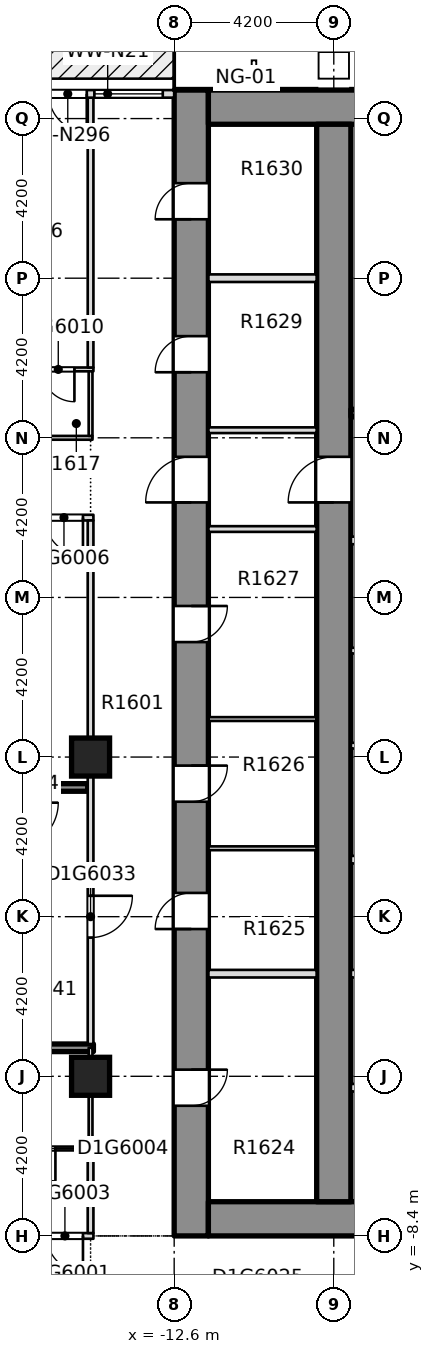
"""IFC4 building model, lengths in metres.
Left out: names, types, materials, properties, quantities, classifications, styles, units other than length and angle.
Written with IfcOpenShell. Run it as: python <this file> out.ifc"""

import sys

from ifc_helpers import new_model, si_unit, direction, frame, frame_2d, origin, origin_2d, place, context, subcontext, project, spatial, rectangle, extrude, element, fill, save


model = new_model("IFC4")
c1 = context("Model", 3, precision=1e-05, world=origin(), true_north=direction((0.0, 1.0)))
c2 = subcontext(c1, "Body", "Model", "MODEL_VIEW")
j1 = project(units=[si_unit("LENGTHUNIT", "METRE"), si_unit("PLANEANGLEUNIT", "RADIAN")], contexts=[c1])
p1 = place(None, origin())
s1 = spatial("IfcSite", under=j1, at=p1, CompositionType="ELEMENT")
p2 = place(p1, origin())
s2 = spatial("IfcBuilding", under=s1, at=p2, CompositionType="ELEMENT")
p3 = place(p2, frame((0.0, 0.0, 69.0)))
s3 = spatial("IfcBuildingStorey", under=s2, at=p3, CompositionType="ELEMENT", Elevation=69.0)
p4 = place(p3, frame((-12.15, -8.4, -0.32), z_axis=(0.0, 0.0, 1.0), x_axis=(0.0, 1.0, 0.0)))
e1 = element("IfcWall", 1, at=p4, inside=s3, PredefinedType="SHEAR", context=c2, shape_type="SweptSolid", body=[
    extrude(rectangle(XDim=30.15, YDim=0.9, at=frame_2d((15.075, 0.0))), origin(), (0.0, 0.0, 1.0), 3.45),
])
p5 = place(p4, frame((3.425, 0.0, 0.32)))
e2 = element("IfcOpeningElement", 2, at=p5, cuts=e1, PredefinedType="OPENING", context=c2, shape_type="SweptSolid", body=[
    extrude(rectangle(XDim=0.95, YDim=2.1, at=frame_2d((0.475, 1.05))), frame((0.0, 0.46, 0.0), z_axis=(0.0, -1.0, 0.0), x_axis=(1.0, 0.0, 0.0)), (0.0, 0.0, 1.0), 0.92),
])
p6 = place(p4, frame((8.075, 0.0, 0.32)))
e3 = element("IfcOpeningElement", 3, at=p6, cuts=e1, PredefinedType="OPENING", context=c2, shape_type="SweptSolid", body=[
    extrude(rectangle(XDim=0.95, YDim=2.1, at=frame_2d((0.475, 1.05))), frame((0.0, 0.46, 0.0), z_axis=(0.0, -1.0, 0.0), x_axis=(1.0, 0.0, 0.0)), (0.0, 0.0, 1.0), 0.92),
])
p7 = place(p4, frame((11.425, 0.0, 0.32)))
e4 = element("IfcOpeningElement", 4, at=p7, cuts=e1, PredefinedType="OPENING", context=c2, shape_type="SweptSolid", body=[
    extrude(rectangle(XDim=0.95, YDim=2.1, at=frame_2d((0.475, 1.05))), frame((0.0, 0.46, 0.0), z_axis=(0.0, -1.0, 0.0), x_axis=(1.0, 0.0, 0.0)), (0.0, 0.0, 1.0), 0.92),
])
p8 = place(p4, frame((15.625, 0.0, 0.32)))
e5 = element("IfcOpeningElement", 5, at=p8, cuts=e1, PredefinedType="OPENING", context=c2, shape_type="SweptSolid", body=[
    extrude(rectangle(XDim=0.95, YDim=2.1, at=frame_2d((0.475, 1.05))), frame((0.0, 0.46, 0.0), z_axis=(0.0, -1.0, 0.0), x_axis=(1.0, 0.0, 0.0)), (0.0, 0.0, 1.0), 0.92),
])
p9 = place(p4, frame((22.725, 0.0, 0.32)))
e6 = element("IfcOpeningElement", 6, at=p9, cuts=e1, PredefinedType="OPENING", context=c2, shape_type="SweptSolid", body=[
    extrude(rectangle(XDim=0.95, YDim=2.1, at=frame_2d((0.475, 1.05))), frame((0.0, 0.46, 0.0), z_axis=(0.0, -1.0, 0.0), x_axis=(1.0, 0.0, 0.0)), (0.0, 0.0, 1.0), 0.92),
])
p10 = place(p4, frame((26.75, 0.0, 0.32)))
e7 = element("IfcOpeningElement", 7, at=p10, cuts=e1, PredefinedType="OPENING", context=c2, shape_type="SweptSolid", body=[
    extrude(rectangle(XDim=0.95, YDim=2.1, at=frame_2d((0.475, 1.05))), frame((0.0, 0.46, 0.0), z_axis=(0.0, -1.0, 0.0), x_axis=(1.0, 0.0, 0.0)), (0.0, 0.0, 1.0), 0.92),
])
p11 = place(p4, frame((19.3, 0.0, 0.32)))
e8 = element("IfcOpeningElement", 8, at=p11, cuts=e1, PredefinedType="OPENING", context=c2, shape_type="SweptSolid", body=[
    extrude(rectangle(XDim=1.2, YDim=2.1, at=frame_2d((0.6, 1.05))), frame((0.0, 0.46, 0.0), z_axis=(0.0, -1.0, 0.0), x_axis=(1.0, 0.0, 0.0)), (0.0, 0.0, 1.0), 0.92),
])
p12 = place(p3, frame((-11.7, -7.95, -0.32), z_axis=(0.0, 0.0, 1.0), x_axis=(1.0, 0.0, 0.0)))
e9 = element("IfcWall", 9, at=p12, inside=s3, PredefinedType="SHEAR", context=c2, shape_type="SweptSolid", body=[
    extrude(rectangle(XDim=23.4, YDim=0.9, at=frame_2d((11.7, 0.0))), origin(), (0.0, 0.0, 1.0), 3.45),
])
p13 = place(p12, frame((6.95, 0.0, 0.32)))
e10 = element("IfcOpeningElement", 10, at=p13, cuts=e9, PredefinedType="OPENING", context=c2, shape_type="SweptSolid", body=[
    extrude(rectangle(XDim=1.8, YDim=2.1, at=frame_2d((0.9, 1.05))), frame((0.0, 0.46, 0.0), z_axis=(0.0, -1.0, 0.0), x_axis=(1.0, 0.0, 0.0)), (0.0, 0.0, 1.0), 0.92),
])
p14 = place(p12, frame((14.65, 0.0, 0.32)))
e11 = element("IfcOpeningElement", 11, at=p14, cuts=e9, PredefinedType="OPENING", context=c2, shape_type="SweptSolid", body=[
    extrude(rectangle(XDim=1.8, YDim=2.1, at=frame_2d((0.9, 1.05))), frame((0.0, 0.46, 0.0), z_axis=(0.0, -1.0, 0.0), x_axis=(1.0, 0.0, 0.0)), (0.0, 0.0, 1.0), 0.92),
])
p15 = place(p3, frame((-11.7, 21.3, -0.32), z_axis=(0.0, 0.0, 1.0), x_axis=(1.0, 0.0, 0.0)))
e12 = element("IfcWall", 12, at=p15, inside=s3, PredefinedType="SOLIDWALL", context=c2, shape_type="SweptSolid", body=[
    extrude(rectangle(XDim=23.4, YDim=0.9, at=frame_2d((11.7, 0.0))), origin(), (0.0, 0.0, 1.0), 3.45),
])
p16 = place(p3, frame((-8.4, -7.5, -0.32), z_axis=(0.0, 0.0, 1.0), x_axis=(0.0, 1.0, 0.0)))
e13 = element("IfcWall", 13, at=p16, inside=s3, PredefinedType="SHEAR", context=c2, shape_type="SweptSolid", body=[
    extrude(rectangle(XDim=28.35, YDim=0.9, at=frame_2d((14.175, 0.0))), origin(), (0.0, 0.0, 1.0), 3.45),
])
p17 = place(p16, frame((18.4, 0.0, 0.32)))
e14 = element("IfcOpeningElement", 14, at=p17, cuts=e13, PredefinedType="OPENING", context=c2, shape_type="SweptSolid", body=[
    extrude(rectangle(XDim=1.2, YDim=2.1, at=frame_2d((0.6, 1.05))), frame((0.0, 0.46, 0.0), z_axis=(0.0, -1.0, 0.0), x_axis=(1.0, 0.0, 0.0)), (0.0, 0.0, 1.0), 0.92),
])
for number, where, z_axis, x_axis in (
    (15, (-14.8, -4.2, -0.32), (0.0, 0.0, 1.0), (1.0, 0.0, 0.0)),
    (16, (-14.8, 4.2, -0.32), (0.0, 0.0, 1.0), (1.0, 0.0, 0.0)),
):
    element("IfcColumn", number, at=place(p3, frame(where, z_axis=z_axis, x_axis=x_axis)), inside=s3, PredefinedType="COLUMN", context=c2, shape_type="SweptSolid", body=[
        extrude(rectangle(XDim=1.0, YDim=1.0, at=origin_2d()), origin(), (0.0, 0.0, 1.0), 3.45),
    ])
p18 = place(p3, frame((-25.75, -8.4, 0.0), z_axis=(0.0, 0.0, 1.0), x_axis=(1.0, 0.0, 0.0)))
e17 = element("IfcWall", 17, at=p18, inside=s3, PredefinedType="PARTITIONING", context=c2, shape_type="SweptSolid", body=[
    extrude(rectangle(XDim=11.025, YDim=0.15, at=frame_2d((5.512, 0.0))), origin(), (0.0, 0.0, 1.0), 3.13),
])
p19 = place(p18, frame((9.8, 0.0, 0.0)))
e18 = element("IfcOpeningElement", 18, at=p19, cuts=e17, PredefinedType="OPENING", context=c2, shape_type="SweptSolid", body=[
    extrude(rectangle(XDim=0.95, YDim=2.1, at=frame_2d((0.475, 1.05))), frame((0.0, 0.085, 0.0), z_axis=(0.0, -1.0, 0.0), x_axis=(1.0, 0.0, 0.0)), (0.0, 0.0, 1.0), 0.17),
])
p20 = place(p3, frame((-17.55, -6.1, 0.0), z_axis=(0.0, 0.0, 1.0), x_axis=(1.0, 0.0, 0.0)))
e19 = element("IfcWall", 19, at=p20, inside=s3, PredefinedType="PARTITIONING", context=c2, shape_type="SweptSolid", body=[
    extrude(rectangle(XDim=2.825, YDim=0.1, at=frame_2d((1.413, 0.0))), origin(), (0.0, 0.0, 1.0), 3.13),
])
p21 = place(p20, frame((0.975, 0.0, 0.0)))
e20 = element("IfcOpeningElement", 20, at=p21, cuts=e19, PredefinedType="OPENING", context=c2, shape_type="SweptSolid", body=[
    extrude(rectangle(XDim=0.85, YDim=2.1, at=frame_2d((0.425, 1.05))), frame((0.0, 0.06, 0.0), z_axis=(0.0, -1.0, 0.0), x_axis=(1.0, 0.0, 0.0)), (0.0, 0.0, 1.0), 0.12),
])
p22 = place(p3, frame((-17.55, -3.45, 0.0), z_axis=(0.0, 0.0, 1.0), x_axis=(1.0, 0.0, 0.0)))
e21 = element("IfcWall", 21, at=p22, inside=s3, PredefinedType="SOLIDWALL", context=c2, shape_type="SweptSolid", body=[
    extrude(rectangle(XDim=2.825, YDim=0.2, at=frame_2d((1.413, 0.0))), origin(), (0.0, 0.0, 1.0), 3.13),
])
p23 = place(p3, frame((-20.45, 3.4, 0.0), z_axis=(0.0, 0.0, 1.0), x_axis=(1.0, 0.0, 0.0)))
e22 = element("IfcWall", 22, at=p23, inside=s3, PredefinedType="SOLIDWALL", context=c2, shape_type="SweptSolid", body=[
    extrude(rectangle(XDim=5.575, YDim=0.2, at=frame_2d((2.788, 0.0))), origin(), (0.0, 0.0, 1.0), 3.13),
])
p24 = place(p3, frame((-25.75, 10.5, 0.0), z_axis=(0.0, 0.0, 1.0), x_axis=(1.0, 0.0, 0.0)))
e23 = element("IfcWall", 23, at=p24, inside=s3, PredefinedType="PARTITIONING", context=c2, shape_type="SweptSolid", body=[
    extrude(rectangle(XDim=11.025, YDim=0.15, at=frame_2d((5.512, 0.0))), origin(), (0.0, 0.0, 1.0), 3.13),
])
p25 = place(p24, frame((9.75, 0.0, 0.0)))
e24 = element("IfcOpeningElement", 24, at=p25, cuts=e23, PredefinedType="OPENING", context=c2, shape_type="SweptSolid", body=[
    extrude(rectangle(XDim=1.0, YDim=2.1, at=frame_2d((0.5, 1.05))), frame((0.0, 0.085, 0.0), z_axis=(0.0, -1.0, 0.0), x_axis=(1.0, 0.0, 0.0)), (0.0, 0.0, 1.0), 0.17),
])
p26 = place(p3, frame((-17.25, 12.6, 0.0), z_axis=(0.0, 0.0, 1.0), x_axis=(1.0, 0.0, 0.0)))
e25 = element("IfcWall", 25, at=p26, inside=s3, PredefinedType="PARTITIONING", context=c2, shape_type="SweptSolid", body=[
    extrude(rectangle(XDim=2.5, YDim=0.1, at=frame_2d((1.25, 0.0))), origin(), (0.0, 0.0, 1.0), 3.13),
])
p27 = place(p3, frame((-17.25, 14.4, 0.0), z_axis=(0.0, 0.0, 1.0), x_axis=(1.0, 0.0, 0.0)))
e26 = element("IfcWall", 26, at=p27, inside=s3, PredefinedType="PARTITIONING", context=c2, shape_type="SweptSolid", body=[
    extrude(rectangle(XDim=2.525, YDim=0.1, at=frame_2d((1.262, 0.0))), origin(), (0.0, 0.0, 1.0), 3.13),
])
p28 = place(p27, frame((1.175, 0.0, 0.0)))
e27 = element("IfcOpeningElement", 27, at=p28, cuts=e26, PredefinedType="OPENING", context=c2, shape_type="SweptSolid", body=[
    extrude(rectangle(XDim=0.85, YDim=2.1, at=frame_2d((0.425, 1.05))), frame((0.0, 0.06, 0.0), z_axis=(0.0, -1.0, 0.0), x_axis=(1.0, 0.0, 0.0)), (0.0, 0.0, 1.0), 0.12),
])
p29 = place(p3, frame((-14.8, -8.325, 0.0), z_axis=(0.0, 0.0, 1.0), x_axis=(0.0, 1.0, 0.0)))
e28 = element("IfcWall", 28, at=p29, inside=s3, PredefinedType="PARTITIONING", context=c2, shape_type="SweptSolid", body=[
    extrude(rectangle(XDim=2.175, YDim=0.15, at=frame_2d((1.087, 0.0))), origin(), (0.0, 0.0, 1.0), 3.13),
])
p30 = place(p3, frame((-14.8, -6.05, 0.0), z_axis=(0.0, 0.0, 1.0), x_axis=(0.0, 1.0, 0.0)))
e29 = element("IfcWall", 29, at=p30, inside=s3, PredefinedType="PARTITIONING", context=c2, shape_type="SweptSolid", body=[
    extrude(rectangle(XDim=2.6, YDim=0.1, at=frame_2d((1.3, 0.0))), origin(), (0.0, 0.0, 1.0), 3.13),
])
p31 = place(p3, frame((-14.8, -3.35, 0.0), z_axis=(0.0, 0.0, 1.0), x_axis=(0.0, 1.0, 0.0)))
e30 = element("IfcWall", 30, at=p31, inside=s3, PredefinedType="PARTITIONING", context=c2, shape_type="SweptSolid", body=[
    extrude(rectangle(XDim=13.775, YDim=0.15, at=frame_2d((6.888, 0.0))), origin(), (0.0, 0.0, 1.0), 3.13),
])
p32 = place(p31, frame((2.8, 0.0, 0.0)))
e31 = element("IfcOpeningElement", 31, at=p32, cuts=e30, PredefinedType="OPENING", context=c2, shape_type="SweptSolid", body=[
    extrude(rectangle(XDim=1.1, YDim=2.1, at=frame_2d((0.55, 1.05))), frame((0.0, 0.085, 0.0), z_axis=(0.0, -1.0, 0.0), x_axis=(1.0, 0.0, 0.0)), (0.0, 0.0, 1.0), 0.17),
])
p33 = place(p3, frame((-14.8, 12.65, 0.0), z_axis=(0.0, 0.0, 1.0), x_axis=(0.0, 1.0, 0.0)))
e32 = element("IfcWall", 32, at=p33, inside=s3, PredefinedType="PARTITIONING", context=c2, shape_type="SweptSolid", body=[
    extrude(rectangle(XDim=1.7, YDim=0.1, at=frame_2d((0.85, 0.0))), origin(), (0.0, 0.0, 1.0), 3.13),
])
p34 = place(p3, frame((-14.8, 14.45, 0.0), z_axis=(0.0, 0.0, 1.0), x_axis=(0.0, 1.0, 0.0)))
e33 = element("IfcWall", 33, at=p34, inside=s3, PredefinedType="PARTITIONING", context=c2, shape_type="SweptSolid", body=[
    extrude(rectangle(XDim=7.1, YDim=0.15, at=frame_2d((3.55, 0.0))), origin(), (0.0, 0.0, 1.0), 3.13),
])
p35 = place(p3, frame((-12.6, 21.65, 0.0), z_axis=(0.0, 0.0, 1.0), x_axis=(-1.0, 0.0, 0.0)))
e34 = element("IfcWall", 34, at=p35, inside=s3, PredefinedType="STANDARD", context=c2, shape_type="SweptSolid", body=[
    extrude(rectangle(XDim=3.5, YDim=0.2, at=frame_2d((1.75, 0.0))), origin(), (0.0, 0.0, 1.0), 3.13),
])
p36 = place(p35, frame((0.3, 0.0, 0.2)))
e35 = element("IfcOpeningElement", 35, at=p36, cuts=e34, PredefinedType="OPENING", context=c2, shape_type="SweptSolid", body=[
    extrude(rectangle(XDim=1.8, YDim=2.65, at=frame_2d((0.9, 1.325))), frame((0.0, 0.11, 0.0), z_axis=(0.0, -1.0, 0.0), x_axis=(1.0, 0.0, 0.0)), (0.0, 0.0, 1.0), 0.22),
])
p37 = place(p35, frame((2.3, 0.0, 0.0)))
e36 = element("IfcOpeningElement", 36, at=p37, cuts=e34, PredefinedType="OPENING", context=c2, shape_type="SweptSolid", body=[
    extrude(rectangle(XDim=1.0, YDim=2.4, at=frame_2d((0.5, 1.2))), frame((0.0, 0.11, 0.0), z_axis=(0.0, -1.0, 0.0), x_axis=(1.0, 0.0, 0.0)), (0.0, 0.0, 1.0), 0.22),
])
for number, where, z_axis, x_axis in (
    (37, (-7.949, -4.5, 0.0), (0.0, 0.0, 1.0), (1.0, 0.0, 0.0)),
    (38, (-7.949, -1.5, 0.0), (0.0, 0.0, 1.0), (1.0, 0.0, 0.0)),
    (39, (-7.949, 1.5, 0.0), (0.0, 0.0, 1.0), (1.0, 0.0, 0.0)),
):
    element("IfcWall", number, at=place(p3, frame(where, z_axis=z_axis, x_axis=x_axis)), inside=s3, PredefinedType="PARTITIONING", context=c2, shape_type="SweptSolid", body=[
        extrude(rectangle(XDim=2.374, YDim=0.2, at=frame_2d((1.187, 0.0))), origin(), (0.0, 0.0, 1.0), 3.13),
    ])
p38 = place(p3, frame((-7.949, 4.5, 0.0), z_axis=(0.0, 0.0, 1.0), x_axis=(1.0, 0.0, 0.0)))
e40 = element("IfcWall", 40, at=p38, inside=s3, PredefinedType="PARTITIONING", context=c2, shape_type="SweptSolid", body=[
    extrude(rectangle(XDim=2.524, YDim=0.15, at=frame_2d((1.262, 0.0))), origin(), (0.0, 0.0, 1.0), 3.13),
])
p39 = place(p3, frame((-7.949, 7.0, 0.0), z_axis=(0.0, 0.0, 1.0), x_axis=(1.0, 0.0, 0.0)))
e41 = element("IfcWall", 41, at=p39, inside=s3, PredefinedType="PARTITIONING", context=c2, shape_type="SweptSolid", body=[
    extrude(rectangle(XDim=15.898, YDim=0.15, at=frame_2d((7.949, 0.0))), origin(), (0.0, 0.0, 1.0), 3.13),
])
p40 = place(p39, frame((7.249, 0.0, 0.0)))
e42 = element("IfcOpeningElement", 42, at=p40, cuts=e41, PredefinedType="OPENING", context=c2, shape_type="SweptSolid", body=[
    extrude(rectangle(XDim=1.4, YDim=2.1, at=frame_2d((0.7, 1.05))), frame((0.0, 0.085, 0.0), z_axis=(0.0, -1.0, 0.0), x_axis=(1.0, 0.0, 0.0)), (0.0, 0.0, 1.0), 0.17),
])
p41 = place(p3, frame((-7.949, 9.9, 0.0), z_axis=(0.0, 0.0, 1.0), x_axis=(1.0, 0.0, 0.0)))
e43 = element("IfcWall", 43, at=p41, inside=s3, PredefinedType="PARTITIONING", context=c2, shape_type="SweptSolid", body=[
    extrude(rectangle(XDim=4.349, YDim=0.2, at=frame_2d((2.174, 0.0))), origin(), (0.0, 0.0, 1.0), 3.13),
])
p42 = place(p41, frame((0.999, 0.0, 0.0)))
e44 = element("IfcOpeningElement", 44, at=p42, cuts=e43, PredefinedType="OPENING", context=c2, shape_type="SweptSolid", body=[
    extrude(rectangle(XDim=1.1, YDim=2.1, at=frame_2d((0.55, 1.05))), frame((0.0, 0.11, 0.0), z_axis=(0.0, -1.0, 0.0), x_axis=(1.0, 0.0, 0.0)), (0.0, 0.0, 1.0), 0.22),
])
p43 = place(p3, frame((-7.949, 13.25, 0.0), z_axis=(0.0, 0.0, 1.0), x_axis=(1.0, 0.0, 0.0)))
e45 = element("IfcWall", 45, at=p43, inside=s3, PredefinedType="SOLIDWALL", context=c2, shape_type="SweptSolid", body=[
    extrude(rectangle(XDim=4.524, YDim=0.2, at=frame_2d((2.262, 0.0))), origin(), (0.0, 0.0, 1.0), 3.13),
])
p44 = place(p43, frame((1.499, 0.0, 0.0)))
e46 = element("IfcOpeningElement", 46, at=p44, cuts=e45, PredefinedType="OPENING", context=c2, shape_type="SweptSolid", body=[
    extrude(rectangle(XDim=1.2, YDim=2.1, at=frame_2d((0.6, 1.05))), frame((0.0, 0.11, 0.0), z_axis=(0.0, -1.0, 0.0), x_axis=(1.0, 0.0, 0.0)), (0.0, 0.0, 1.0), 0.22),
])
p45 = place(p3, frame((-11.699, -1.5, 0.0), z_axis=(0.0, 0.0, 1.0), x_axis=(1.0, 0.0, 0.0)))
e47 = element("IfcWall", 47, at=p45, inside=s3, PredefinedType="PARTITIONING", context=c2, shape_type="SweptSolid", body=[
    extrude(rectangle(XDim=2.848, YDim=0.2, at=frame_2d((1.424, 0.0))), origin(), (0.0, 0.0, 1.0), 3.13),
])
for number, where, z_axis, x_axis in (
    (48, (-11.699, 1.8, 0.0), (0.0, 0.0, 1.0), (1.0, 0.0, 0.0)),
    (49, (-11.699, 5.2, 0.0), (0.0, 0.0, 1.0), (1.0, 0.0, 0.0)),
):
    element("IfcWall", number, at=place(p3, frame(where, z_axis=z_axis, x_axis=x_axis)), inside=s3, PredefinedType="PARTITIONING", context=c2, shape_type="SweptSolid", body=[
        extrude(rectangle(XDim=2.848, YDim=0.1, at=frame_2d((1.424, 0.0))), origin(), (0.0, 0.0, 1.0), 3.13),
    ])
for number, where, z_axis, x_axis in (
    (50, (-11.699, 10.2, 0.0), (0.0, 0.0, 1.0), (1.0, 0.0, 0.0)),
    (51, (-11.699, 12.8, 0.0), (0.0, 0.0, 1.0), (1.0, 0.0, 0.0)),
):
    element("IfcWall", number, at=place(p3, frame(where, z_axis=z_axis, x_axis=x_axis)), inside=s3, PredefinedType="PARTITIONING", context=c2, shape_type="SweptSolid", body=[
        extrude(rectangle(XDim=2.848, YDim=0.15, at=frame_2d((1.424, 0.0))), origin(), (0.0, 0.0, 1.0), 3.13),
    ])
p46 = place(p3, frame((-11.699, 16.8, 0.0), z_axis=(0.0, 0.0, 1.0), x_axis=(1.0, 0.0, 0.0)))
e52 = element("IfcWall", 52, at=p46, inside=s3, PredefinedType="PARTITIONING", context=c2, shape_type="SweptSolid", body=[
    extrude(rectangle(XDim=2.848, YDim=0.2, at=frame_2d((1.424, 0.0))), origin(), (0.0, 0.0, 1.0), 3.13),
])
p47 = place(p19, origin())
e53 = element("IfcDoor", 53, at=p47, inside=s3, OperationType="SINGLE_SWING_LEFT", PredefinedType="DOOR", context=c2, shape_type="SweptSolid", body=[
    extrude(rectangle(XDim=0.95, YDim=2.1, at=frame_2d((0.475, 1.05))), frame((0.0, 0.025, 0.0), z_axis=(0.0, -1.0, 0.0), x_axis=(1.0, 0.0, 0.0)), (0.0, 0.0, 1.0), 0.05),
])
fill(e18, e53)
p48 = place(p21, origin())
e54 = element("IfcDoor", 54, at=p48, inside=s3, OperationType="SINGLE_SWING_LEFT", PredefinedType="DOOR", context=c2, shape_type="SweptSolid", body=[
    extrude(rectangle(XDim=0.85, YDim=2.1, at=frame_2d((0.425, 1.05))), frame((0.0, 0.025, 0.0), z_axis=(0.0, -1.0, 0.0), x_axis=(1.0, 0.0, 0.0)), (0.0, 0.0, 1.0), 0.05),
])
fill(e20, e54)
p49 = place(p25, origin())
e55 = element("IfcDoor", 55, at=p49, inside=s3, OperationType="SINGLE_SWING_RIGHT", PredefinedType="DOOR", context=c2, shape_type="SweptSolid", body=[
    extrude(rectangle(XDim=1.0, YDim=2.1, at=frame_2d((0.5, 1.05))), frame((0.0, 0.025, 0.0), z_axis=(0.0, -1.0, 0.0), x_axis=(1.0, 0.0, 0.0)), (0.0, 0.0, 1.0), 0.05),
])
fill(e24, e55)
p50 = place(p28, origin())
e56 = element("IfcDoor", 56, at=p50, inside=s3, OperationType="SINGLE_SWING_RIGHT", PredefinedType="DOOR", context=c2, shape_type="SweptSolid", body=[
    extrude(rectangle(XDim=0.85, YDim=2.1, at=frame_2d((0.425, 1.05))), frame((0.0, 0.025, 0.0), z_axis=(0.0, -1.0, 0.0), x_axis=(1.0, 0.0, 0.0)), (0.0, 0.0, 1.0), 0.05),
])
fill(e27, e56)
p51 = place(p32, origin())
e57 = element("IfcDoor", 57, at=p51, inside=s3, OperationType="SINGLE_SWING_RIGHT", PredefinedType="DOOR", context=c2, shape_type="SweptSolid", body=[
    extrude(rectangle(XDim=1.1, YDim=2.1, at=frame_2d((0.55, 1.05))), frame((0.0, 0.025, 0.0), z_axis=(0.0, -1.0, 0.0), x_axis=(1.0, 0.0, 0.0)), (0.0, 0.0, 1.0), 0.05),
])
fill(e31, e57)
p52 = place(p36, origin())
e58 = element("IfcWindow", 58, at=p52, inside=s3, PartitioningType="SINGLE_PANEL", PredefinedType="WINDOW", context=c2, shape_type="SweptSolid", body=[
    extrude(rectangle(XDim=1.8, YDim=2.65, at=frame_2d((0.9, 1.325))), frame((0.0, 0.03, 0.0), z_axis=(0.0, -1.0, 0.0), x_axis=(1.0, 0.0, 0.0)), (0.0, 0.0, 1.0), 0.06),
])
fill(e35, e58)
p53 = place(p37, origin())
e59 = element("IfcDoor", 59, at=p53, inside=s3, OperationType="SINGLE_SWING_LEFT", PredefinedType="DOOR", context=c2, shape_type="SweptSolid", body=[
    extrude(rectangle(XDim=1.0, YDim=2.4, at=frame_2d((0.5, 1.2))), frame((0.0, 0.025, 0.0), z_axis=(0.0, -1.0, 0.0), x_axis=(1.0, 0.0, 0.0)), (0.0, 0.0, 1.0), 0.05),
])
fill(e36, e59)
p54 = place(p5, origin())
e60 = element("IfcDoor", 60, at=p54, inside=s3, OperationType="SINGLE_SWING_LEFT", PredefinedType="DOOR", context=c2, shape_type="SweptSolid", body=[
    extrude(rectangle(XDim=0.95, YDim=2.1, at=frame_2d((0.475, 1.05))), frame((0.0, 0.025, 0.0), z_axis=(0.0, -1.0, 0.0), x_axis=(1.0, 0.0, 0.0)), (0.0, 0.0, 1.0), 0.05),
])
fill(e2, e60)
p55 = place(p6, origin())
e61 = element("IfcDoor", 61, at=p55, inside=s3, OperationType="SINGLE_SWING_LEFT", PredefinedType="DOOR", context=c2, shape_type="SweptSolid", body=[
    extrude(rectangle(XDim=0.95, YDim=2.1, at=frame_2d((0.475, 1.05))), frame((0.0, 0.025, 0.0), z_axis=(0.0, -1.0, 0.0), x_axis=(1.0, 0.0, 0.0)), (0.0, 0.0, 1.0), 0.05),
])
fill(e3, e61)
p56 = place(p7, origin())
e62 = element("IfcDoor", 62, at=p56, inside=s3, OperationType="SINGLE_SWING_LEFT", PredefinedType="DOOR", context=c2, shape_type="SweptSolid", body=[
    extrude(rectangle(XDim=0.95, YDim=2.1, at=frame_2d((0.475, 1.05))), frame((0.0, 0.025, 0.0), z_axis=(0.0, -1.0, 0.0), x_axis=(1.0, 0.0, 0.0)), (0.0, 0.0, 1.0), 0.05),
])
fill(e4, e62)
p57 = place(p8, origin())
e63 = element("IfcDoor", 63, at=p57, inside=s3, OperationType="SINGLE_SWING_LEFT", PredefinedType="DOOR", context=c2, shape_type="SweptSolid", body=[
    extrude(rectangle(XDim=0.95, YDim=2.1, at=frame_2d((0.475, 1.05))), frame((0.0, 0.025, 0.0), z_axis=(0.0, -1.0, 0.0), x_axis=(1.0, 0.0, 0.0)), (0.0, 0.0, 1.0), 0.05),
])
fill(e5, e63)
p58 = place(p9, origin())
e64 = element("IfcDoor", 64, at=p58, inside=s3, OperationType="SINGLE_SWING_LEFT", PredefinedType="DOOR", context=c2, shape_type="SweptSolid", body=[
    extrude(rectangle(XDim=0.95, YDim=2.1, at=frame_2d((0.475, 1.05))), frame((0.0, 0.025, 0.0), z_axis=(0.0, -1.0, 0.0), x_axis=(1.0, 0.0, 0.0)), (0.0, 0.0, 1.0), 0.05),
])
fill(e6, e64)
p59 = place(p10, origin())
e65 = element("IfcDoor", 65, at=p59, inside=s3, OperationType="SINGLE_SWING_LEFT", PredefinedType="DOOR", context=c2, shape_type="SweptSolid", body=[
    extrude(rectangle(XDim=0.95, YDim=2.1, at=frame_2d((0.475, 1.05))), frame((0.0, 0.025, 0.0), z_axis=(0.0, -1.0, 0.0), x_axis=(1.0, 0.0, 0.0)), (0.0, 0.0, 1.0), 0.05),
])
fill(e7, e65)
p60 = place(p11, origin())
e66 = element("IfcDoor", 66, at=p60, inside=s3, OperationType="SINGLE_SWING_LEFT", PredefinedType="DOOR", context=c2, shape_type="SweptSolid", body=[
    extrude(rectangle(XDim=1.2, YDim=2.1, at=frame_2d((0.6, 1.05))), frame((0.0, 0.025, 0.0), z_axis=(0.0, -1.0, 0.0), x_axis=(1.0, 0.0, 0.0)), (0.0, 0.0, 1.0), 0.05),
])
fill(e8, e66)
p61 = place(p17, origin())
e67 = element("IfcDoor", 67, at=p61, inside=s3, OperationType="SINGLE_SWING_LEFT", PredefinedType="DOOR", context=c2, shape_type="SweptSolid", body=[
    extrude(rectangle(XDim=1.2, YDim=2.1, at=frame_2d((0.6, 1.05))), frame((0.0, 0.025, 0.0), z_axis=(0.0, -1.0, 0.0), x_axis=(1.0, 0.0, 0.0)), (0.0, 0.0, 1.0), 0.05),
])
fill(e14, e67)
save(model, sys.argv[1])
